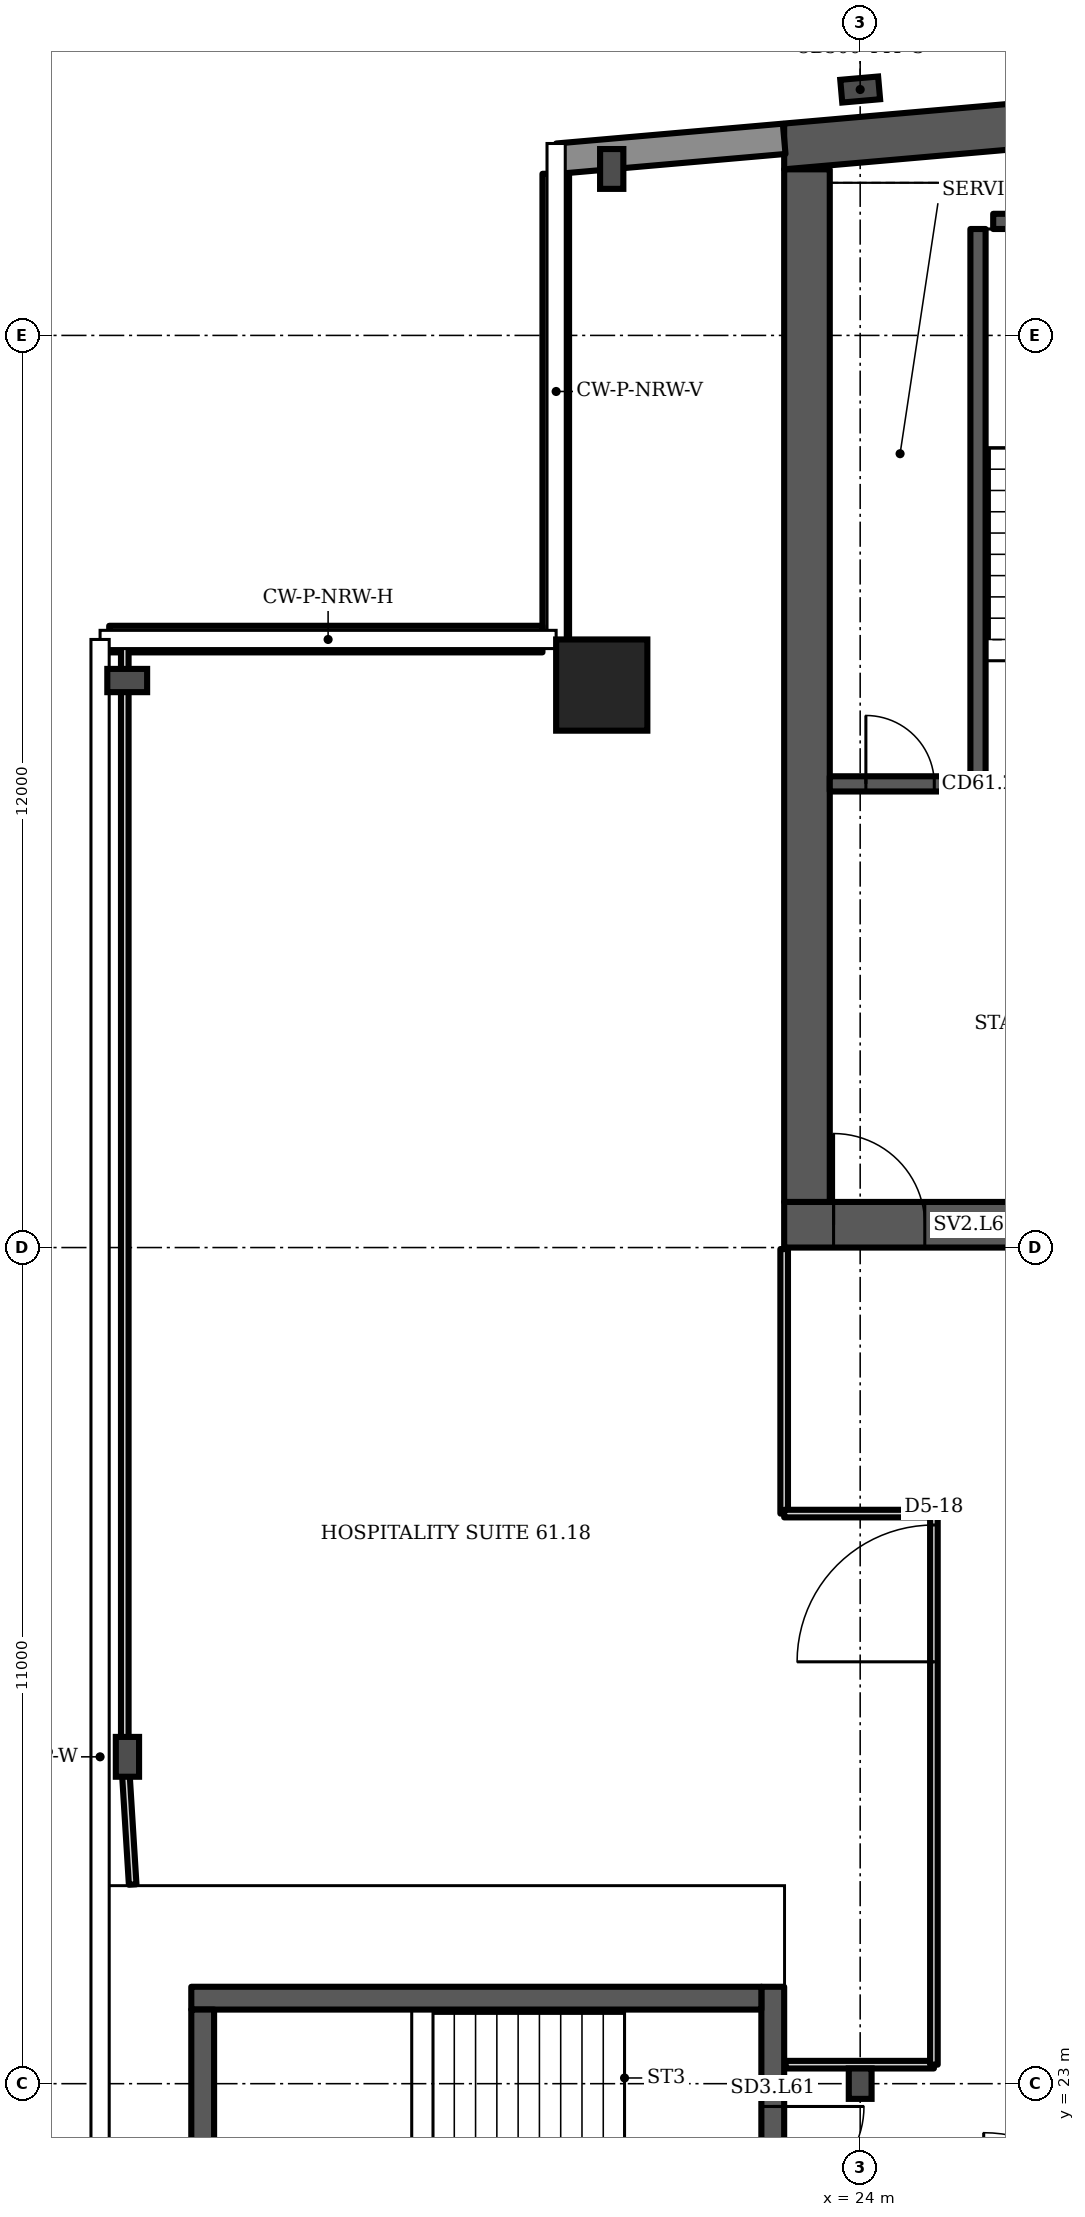
"""IFC4 building model, lengths in metres.
Left out: names, types, materials, properties, quantities, classifications, styles, units other than length and angle.
Written with IfcOpenShell. Run it as: python <this file> out.ifc"""

import sys

from ifc_helpers import new_model, si_unit, direction, frame, frame_2d, origin, origin_2d, place, context, subcontext, project, spatial, polyline, rectangle, i_section, outline, extrude, element, fill, save


model = new_model("IFC4")
c1 = context("Model", 3, precision=1e-05, world=origin(), true_north=direction((0.0, 1.0)))
c2 = subcontext(c1, "Body", "Model", "MODEL_VIEW")
j1 = project(units=[si_unit("LENGTHUNIT", "METRE"), si_unit("PLANEANGLEUNIT", "RADIAN")], contexts=[c1])
p1 = place(None, origin())
s1 = spatial("IfcSite", under=j1, at=p1, CompositionType="ELEMENT")
p2 = place(p1, origin())
s2 = spatial("IfcBuilding", under=s1, at=p2, CompositionType="ELEMENT")
p3 = place(p2, frame((0.0, 0.0, 243.1)))
s3 = spatial("IfcBuildingStorey", under=s2, at=p3, CompositionType="ELEMENT", Elevation=243.1)
p4 = place(p3, frame((0.0, 0.0, -0.0)))
e1 = element("IfcWall", 1, at=p4, inside=s3, PredefinedType="SHEAR", context=c2, shape_type="SweptSolid", body=[
    extrude(outline(polyline([(23.0, 48.185), (40.5, 49.716), (58.0, 48.185), (58.0, 48.787), (40.5, 50.318), (23.0, 48.787), (23.0, 48.185)])), origin(), (0.0, 0.0, 1.0), 3.6),
])
p5 = place(p3, frame((23.0, 34.3, 0.0), z_axis=(0.0, 0.0, 1.0), x_axis=(1.0, 0.0, 0.0)))
e2 = element("IfcWall", 2, at=p5, inside=s3, PredefinedType="SHEAR", context=c2, shape_type="SweptSolid", body=[
    extrude(rectangle(XDim=35.0, YDim=0.6, at=frame_2d((17.5, 0.0))), origin(), (0.0, 0.0, 1.0), 3.6),
])
p6 = place(p5, frame((0.65, 0.0, 0.0)))
e3 = element("IfcOpeningElement", 3, at=p6, cuts=e2, PredefinedType="OPENING", context=c2, shape_type="SweptSolid", body=[
    extrude(rectangle(XDim=1.2, YDim=2.1, at=frame_2d((0.6, 1.05))), frame((0.0, 0.31, 0.0), z_axis=(0.0, -1.0, 0.0), x_axis=(1.0, 0.0, 0.0)), (0.0, 0.0, 1.0), 0.62),
])
p7 = place(p5, frame((7.717, 0.0, 0.0)))
e4 = element("IfcOpeningElement", 4, at=p7, cuts=e2, PredefinedType="OPENING", context=c2, shape_type="SweptSolid", body=[
    extrude(rectangle(XDim=1.1, YDim=2.1, at=frame_2d((0.55, 1.05))), frame((0.0, 0.31, 0.0), z_axis=(0.0, -1.0, 0.0), x_axis=(1.0, 0.0, 0.0)), (0.0, 0.0, 1.0), 0.62),
])
p8 = place(p5, frame((12.183, 0.0, 0.0)))
e5 = element("IfcOpeningElement", 5, at=p8, cuts=e2, PredefinedType="OPENING", context=c2, shape_type="SweptSolid", body=[
    extrude(rectangle(XDim=1.1, YDim=2.1, at=frame_2d((0.55, 1.05))), frame((0.0, 0.31, 0.0), z_axis=(0.0, -1.0, 0.0), x_axis=(1.0, 0.0, 0.0)), (0.0, 0.0, 1.0), 0.62),
])
p9 = place(p5, frame((9.8, 0.0, 0.0)))
e6 = element("IfcOpeningElement", 6, at=p9, cuts=e2, PredefinedType="OPENING", context=c2, shape_type="SweptSolid", body=[
    extrude(rectangle(XDim=1.4, YDim=2.1, at=frame_2d((0.7, 1.05))), frame((0.0, 0.31, 0.0), z_axis=(0.0, -1.0, 0.0), x_axis=(1.0, 0.0, 0.0)), (0.0, 0.0, 1.0), 0.62),
])
p10 = place(p5, frame((14.717, 0.0, 0.0)))
e7 = element("IfcOpeningElement", 7, at=p10, cuts=e2, PredefinedType="OPENING", context=c2, shape_type="SweptSolid", body=[
    extrude(rectangle(XDim=1.1, YDim=2.1, at=frame_2d((0.55, 1.05))), frame((0.0, 0.31, 0.0), z_axis=(0.0, -1.0, 0.0), x_axis=(1.0, 0.0, 0.0)), (0.0, 0.0, 1.0), 0.62),
])
p11 = place(p5, frame((16.95, 0.0, 0.0)))
e8 = element("IfcOpeningElement", 8, at=p11, cuts=e2, PredefinedType="OPENING", context=c2, shape_type="SweptSolid", body=[
    extrude(rectangle(XDim=1.1, YDim=2.1, at=frame_2d((0.55, 1.05))), frame((0.0, 0.31, 0.0), z_axis=(0.0, -1.0, 0.0), x_axis=(1.0, 0.0, 0.0)), (0.0, 0.0, 1.0), 0.62),
])
p12 = place(p5, frame((19.183, 0.0, 0.0)))
e9 = element("IfcOpeningElement", 9, at=p12, cuts=e2, PredefinedType="OPENING", context=c2, shape_type="SweptSolid", body=[
    extrude(rectangle(XDim=1.1, YDim=2.1, at=frame_2d((0.55, 1.05))), frame((0.0, 0.31, 0.0), z_axis=(0.0, -1.0, 0.0), x_axis=(1.0, 0.0, 0.0)), (0.0, 0.0, 1.0), 0.62),
])
p13 = place(p5, frame((26.15, 0.0, 0.0)))
e10 = element("IfcOpeningElement", 10, at=p13, cuts=e2, PredefinedType="OPENING", context=c2, shape_type="SweptSolid", body=[
    extrude(rectangle(XDim=1.2, YDim=2.1, at=frame_2d((0.6, 1.05))), frame((0.0, 0.31, 0.0), z_axis=(0.0, -1.0, 0.0), x_axis=(1.0, 0.0, 0.0)), (0.0, 0.0, 1.0), 0.62),
])
p14 = place(p5, frame((28.767, 0.0, 0.0)))
e11 = element("IfcOpeningElement", 11, at=p14, cuts=e2, PredefinedType="OPENING", context=c2, shape_type="SweptSolid", body=[
    extrude(rectangle(XDim=1.0, YDim=2.1, at=frame_2d((0.5, 1.05))), frame((0.0, 0.31, 0.0), z_axis=(0.0, -1.0, 0.0), x_axis=(1.0, 0.0, 0.0)), (0.0, 0.0, 1.0), 0.62),
])
p15 = place(p5, frame((33.083, 0.0, 0.0)))
e12 = element("IfcOpeningElement", 12, at=p15, cuts=e2, PredefinedType="OPENING", context=c2, shape_type="SweptSolid", body=[
    extrude(rectangle(XDim=1.0, YDim=2.1, at=frame_2d((0.5, 1.05))), frame((0.0, 0.31, 0.0), z_axis=(0.0, -1.0, 0.0), x_axis=(1.0, 0.0, 0.0)), (0.0, 0.0, 1.0), 0.62),
])
p16 = place(p5, frame((30.8, 0.0, 0.0)))
e13 = element("IfcOpeningElement", 13, at=p16, cuts=e2, PredefinedType="OPENING", context=c2, shape_type="SweptSolid", body=[
    extrude(rectangle(XDim=1.4, YDim=2.1, at=frame_2d((0.7, 1.05))), frame((0.0, 0.31, 0.0), z_axis=(0.0, -1.0, 0.0), x_axis=(1.0, 0.0, 0.0)), (0.0, 0.0, 1.0), 0.62),
])
p17 = place(p3, frame((23.3, 34.6, 0.0), z_axis=(0.0, 0.0, 1.0), x_axis=(0.0, 1.0, 0.0)))
e14 = element("IfcWall", 14, at=p17, inside=s3, PredefinedType="SHEAR", context=c2, shape_type="SweptSolid", body=[
    extrude(rectangle(XDim=13.585, YDim=0.6, at=frame_2d((6.792, 0.0))), origin(), (0.0, 0.0, 1.0), 3.6),
])
p18 = place(p3, frame((20.6, 41.4, 0.0), z_axis=(0.0, 0.0, 1.0), x_axis=(1.0, 0.0, 0.0)))
e15 = element("IfcColumn", 15, at=p18, inside=s3, PredefinedType="COLUMN", context=c2, shape_type="SweptSolid", body=[
    extrude(rectangle(XDim=1.2, YDim=1.2, at=origin_2d()), origin(), (0.0, 0.0, 1.0), 3.6),
])
for number, where, z_axis, x_axis in (
    (16, (20.731, 48.19, 0.0), (0.0, 0.0, 1.0), (-1.0, 0.0, 0.0)),
    (17, (14.357, 41.46, 0.0), (0.0, 0.0, 1.0), (0.0, 1.0, 0.0)),
    (18, (14.36, 27.3, 0.0), (0.0, 0.0, 1.0), (-1.0, 0.0, 0.0)),
):
    element("IfcColumn", number, at=place(p3, frame(where, z_axis=z_axis, x_axis=x_axis)), inside=s3, PredefinedType="COLUMN", context=c2, shape_type="SweptSolid", body=[
        extrude(i_section(OverallWidth=0.306, OverallDepth=0.524, WebThickness=0.021, FlangeThickness=0.04, FilletRadius=0.027, at=origin_2d()), origin(), (0.0, 0.0, 1.0), 3.6),
    ])
p19 = place(p3, frame((24.0, 23.0, 0.0), z_axis=(0.0, 0.0, 1.0), x_axis=(1.0, 0.0, 0.0)))
e19 = element("IfcColumn", 19, at=p19, inside=s3, PredefinedType="COLUMN", context=c2, shape_type="SweptSolid", body=[
    extrude(i_section(OverallWidth=0.3, OverallDepth=0.4, WebThickness=0.013, FlangeThickness=0.024, FilletRadius=0.027, at=origin_2d()), origin(), (0.0, 0.0, 1.0), 3.6),
])
p20 = place(p3, frame((24.0, 49.235, 0.0), z_axis=(0.0, 0.0, 1.0), x_axis=(-0.087156, 0.996197, 0.0)))
e20 = element("IfcColumn", 20, at=p20, inside=s3, PredefinedType="COLUMN", context=c2, shape_type="SweptSolid", body=[
    extrude(i_section(OverallWidth=0.3, OverallDepth=0.5, WebThickness=0.014, FlangeThickness=0.028, FilletRadius=0.027, at=origin_2d()), origin(), (0.0, 0.0, 1.0), 3.6),
])
p21 = place(p3, frame((23.0, 48.587, 0.0), z_axis=(0.0, 0.0, 1.0), x_axis=(-0.996194, -0.087168, 0.0)))
e21 = element("IfcWall", 21, at=p21, inside=s3, PredefinedType="SOLIDWALL", context=c2, shape_type="SweptSolid", body=[
    extrude(rectangle(XDim=2.994, YDim=0.4, at=frame_2d((1.497, 0.0))), origin(), (0.0, 0.0, 1.0), 3.2),
])
p22 = place(p3, frame((19.995, 48.126, 0.0), z_axis=(0.0, 0.0, 1.0), x_axis=(0.0, -1.0, 0.0)))
e22 = element("IfcWall", 22, at=p22, inside=s3, PredefinedType="SOLIDWALL", context=c2, shape_type="SweptSolid", body=[
    extrude(rectangle(XDim=6.126, YDim=0.35, at=frame_2d((3.063, 0.0))), origin(), (0.0, 0.0, 1.0), 1.0),
])
p23 = place(p3, frame((19.82, 42.005, 0.0), z_axis=(0.0, 0.0, 1.0), x_axis=(-1.0, 0.0, 0.0)))
e23 = element("IfcWall", 23, at=p23, inside=s3, PredefinedType="SOLIDWALL", context=c2, shape_type="SweptSolid", body=[
    extrude(rectangle(XDim=5.7, YDim=0.35, at=frame_2d((2.85, 0.0))), origin(), (0.0, 0.0, 1.0), 1.0),
])
p24 = place(p3, frame((23.6, 40.1, 0.0), z_axis=(0.0, 0.0, 1.0), x_axis=(1.0, 0.0, 0.0)))
e24 = element("IfcWall", 24, at=p24, inside=s3, PredefinedType="SHEAR", context=c2, shape_type="SweptSolid", body=[
    extrude(rectangle(XDim=6.1, YDim=0.2, at=frame_2d((3.05, 0.0))), origin(), (0.0, 0.0, 1.0), 3.2),
])
p25 = place(p24, frame((3.325, 0.0, 0.0)))
e25 = element("IfcOpeningElement", 25, at=p25, cuts=e24, PredefinedType="OPENING", context=c2, shape_type="SweptSolid", body=[
    extrude(rectangle(XDim=1.2, YDim=2.1, at=frame_2d((0.6, 1.05))), frame((0.0, 0.11, 0.0), z_axis=(0.0, -1.0, 0.0), x_axis=(1.0, 0.0, 0.0)), (0.0, 0.0, 1.0), 0.22),
])
p26 = place(p24, frame((0.475, 0.0, 0.0)))
e26 = element("IfcOpeningElement", 26, at=p26, cuts=e24, PredefinedType="OPENING", context=c2, shape_type="SweptSolid", body=[
    extrude(rectangle(XDim=0.9, YDim=2.1, at=frame_2d((0.45, 1.05))), frame((0.0, 0.11, 0.0), z_axis=(0.0, -1.0, 0.0), x_axis=(1.0, 0.0, 0.0)), (0.0, 0.0, 1.0), 0.22),
])
p27 = place(p3, frame((25.55, 40.2, 0.0), z_axis=(0.0, 0.0, 1.0), x_axis=(0.0, 1.0, 0.0)))
e27 = element("IfcWall", 27, at=p27, inside=s3, PredefinedType="SHEAR", context=c2, shape_type="SweptSolid", body=[
    extrude(rectangle(XDim=7.2, YDim=0.2, at=frame_2d((3.6, 0.0))), origin(), (0.0, 0.0, 1.0), 3.2),
])
p28 = place(p3, frame((25.75, 47.5, 0.0), z_axis=(0.0, 0.0, 1.0), x_axis=(1.0, 0.0, 0.0)))
e28 = element("IfcWall", 28, at=p28, inside=s3, PredefinedType="SHEAR", context=c2, shape_type="SweptSolid", body=[
    extrude(rectangle(XDim=3.95, YDim=0.2, at=frame_2d((1.975, 0.0))), origin(), (0.0, 0.0, 1.0), 3.2),
])
p29 = place(p3, frame((22.85, 19.925, 0.0), z_axis=(0.0, 0.0, 1.0), x_axis=(0.0, 1.0, 0.0)))
e29 = element("IfcWall", 29, at=p29, inside=s3, PredefinedType="SHEAR", context=c2, shape_type="SweptSolid", body=[
    extrude(rectangle(XDim=4.35, YDim=0.3, at=frame_2d((2.175, 0.0))), origin(), (0.0, 0.0, 1.0), 3.2),
])
p30 = place(p29, frame((1.575, 0.0, 0.0)))
e30 = element("IfcOpeningElement", 30, at=p30, cuts=e29, PredefinedType="OPENING", context=c2, shape_type="SweptSolid", body=[
    extrude(rectangle(XDim=1.2, YDim=2.1, at=frame_2d((0.6, 1.05))), frame((0.0, 0.16, 0.0), z_axis=(0.0, -1.0, 0.0), x_axis=(1.0, 0.0, 0.0)), (0.0, 0.0, 1.0), 0.32),
])
p31 = place(p3, frame((14.325, 27.3, 0.0), z_axis=(0.0, 0.0, 1.0), x_axis=(0.0, 1.0, 0.0)))
e31 = element("IfcWall", 31, at=p31, inside=s3, PredefinedType="PARTITIONING", context=c2, shape_type="SweptSolid", body=[
    extrude(rectangle(XDim=14.68, YDim=0.1, at=frame_2d((7.34, 0.0))), origin(), (0.0, 0.0, 1.0), 2.58),
])
p32 = place(p3, frame((14.429, 25.62, 0.0), z_axis=(0.0, 0.0, 1.0), x_axis=(-0.061647, 0.998101, 0.0)))
e32 = element("IfcWall", 32, at=p32, inside=s3, PredefinedType="PARTITIONING", context=c2, shape_type="SweptSolid", body=[
    extrude(rectangle(XDim=1.683, YDim=0.1, at=frame_2d((0.842, 0.0))), origin(), (0.0, 0.0, 1.0), 2.58),
])
p33 = place(p3, frame((23.0, 30.5, 0.0), z_axis=(0.0, 0.0, 1.0), x_axis=(0.0, 1.0, 0.0)))
e33 = element("IfcWall", 33, at=p33, inside=s3, PredefinedType="PARTITIONING", context=c2, shape_type="SweptSolid", body=[
    extrude(rectangle(XDim=3.48, YDim=0.1, at=frame_2d((1.74, 0.0))), origin(), (0.0, 0.0, 1.0), 3.2),
])
p34 = place(p3, frame((23.0, 30.5, 0.0), z_axis=(0.0, 0.0, 1.0), x_axis=(1.0, 0.0, 0.0)))
e34 = element("IfcWall", 34, at=p34, inside=s3, PredefinedType="PARTITIONING", context=c2, shape_type="SweptSolid", body=[
    extrude(rectangle(XDim=1.97, YDim=0.1, at=frame_2d((0.985, 0.0))), origin(), (0.0, 0.0, 1.0), 3.2),
])
p35 = place(p3, frame((23.02, 23.25, 0.0), z_axis=(0.0, 0.0, 1.0), x_axis=(1.0, 0.0, 0.0)))
e35 = element("IfcWall", 35, at=p35, inside=s3, PredefinedType="PARTITIONING", context=c2, shape_type="SweptSolid", body=[
    extrude(rectangle(XDim=1.95, YDim=0.1, at=frame_2d((0.975, 0.0))), origin(), (0.0, 0.0, 1.0), 3.2),
])
p36 = place(p3, frame((24.97, 23.25, 0.0), z_axis=(0.0, 0.0, 1.0), x_axis=(0.0, 1.0, 0.0)))
e36 = element("IfcWall", 36, at=p36, inside=s3, PredefinedType="PARTITIONING", context=c2, shape_type="SweptSolid", body=[
    extrude(rectangle(XDim=7.25, YDim=0.1, at=frame_2d((3.625, 0.0))), origin(), (0.0, 0.0, 1.0), 3.2),
])
p37 = place(p36, frame((5.3, 0.0, 0.0)))
e37 = element("IfcOpeningElement", 37, at=p37, cuts=e36, PredefinedType="OPENING", context=c2, shape_type="SweptSolid", body=[
    extrude(rectangle(XDim=1.8, YDim=2.1, at=frame_2d((0.9, 1.05))), frame((0.0, 0.06, 0.0), z_axis=(0.0, -1.0, 0.0), x_axis=(1.0, 0.0, 0.0)), (0.0, 0.0, 1.0), 0.12),
])
p38 = place(p3, frame((15.2, 24.125, 0.0), z_axis=(0.0, 0.0, 1.0), x_axis=(1.0, 0.0, 0.0)))
e38 = element("IfcWall", 38, at=p38, inside=s3, PredefinedType="SHEAR", context=c2, shape_type="SweptSolid", body=[
    extrude(rectangle(XDim=7.5, YDim=0.3, at=frame_2d((3.75, 0.0))), origin(), (0.0, 0.0, 1.0), 3.2),
])
p39 = place(p3, frame((15.35, 20.225, 0.0), z_axis=(0.0, 0.0, 1.0), x_axis=(0.0, 1.0, 0.0)))
e39 = element("IfcWall", 39, at=p39, inside=s3, PredefinedType="SHEAR", context=c2, shape_type="SweptSolid", body=[
    extrude(rectangle(XDim=3.75, YDim=0.3, at=frame_2d((1.875, 0.0))), origin(), (0.0, 0.0, 1.0), 3.2),
])
p40 = place(p26, origin())
e40 = element("IfcDoor", 40, at=p40, inside=s3, OperationType="SINGLE_SWING_LEFT", PredefinedType="DOOR", context=c2, shape_type="SweptSolid", body=[
    extrude(rectangle(XDim=0.9, YDim=2.1, at=frame_2d((0.45, 1.05))), frame((0.0, 0.025, 0.0), z_axis=(0.0, -1.0, 0.0), x_axis=(1.0, 0.0, 0.0)), (0.0, 0.0, 1.0), 0.05),
])
fill(e26, e40)
p41 = place(p6, origin())
e41 = element("IfcDoor", 41, at=p41, inside=s3, OperationType="SINGLE_SWING_LEFT", PredefinedType="DOOR", context=c2, shape_type="SweptSolid", body=[
    extrude(rectangle(XDim=1.2, YDim=2.1, at=frame_2d((0.6, 1.05))), frame((0.0, 0.025, 0.0), z_axis=(0.0, -1.0, 0.0), x_axis=(1.0, 0.0, 0.0)), (0.0, 0.0, 1.0), 0.05),
])
fill(e3, e41)
p42 = place(p30, origin())
e42 = element("IfcDoor", 42, at=p42, inside=s3, OperationType="SINGLE_SWING_RIGHT", PredefinedType="DOOR", context=c2, shape_type="SweptSolid", body=[
    extrude(rectangle(XDim=1.2, YDim=2.1, at=frame_2d((0.6, 1.05))), frame((0.0, 0.025, 0.0), z_axis=(0.0, -1.0, 0.0), x_axis=(1.0, 0.0, 0.0)), (0.0, 0.0, 1.0), 0.05),
])
fill(e30, e42)
p43 = place(p37, origin())
e43 = element("IfcDoor", 43, at=p43, inside=s3, OperationType="DOUBLE_DOOR_SINGLE_SWING", PredefinedType="DOOR", context=c2, shape_type="SweptSolid", body=[
    extrude(rectangle(XDim=1.8, YDim=2.1, at=frame_2d((0.9, 1.05))), frame((0.0, 0.025, 0.0), z_axis=(0.0, -1.0, 0.0), x_axis=(1.0, 0.0, 0.0)), (0.0, 0.0, 1.0), 0.05),
])
fill(e37, e43)
save(model, sys.argv[1])
